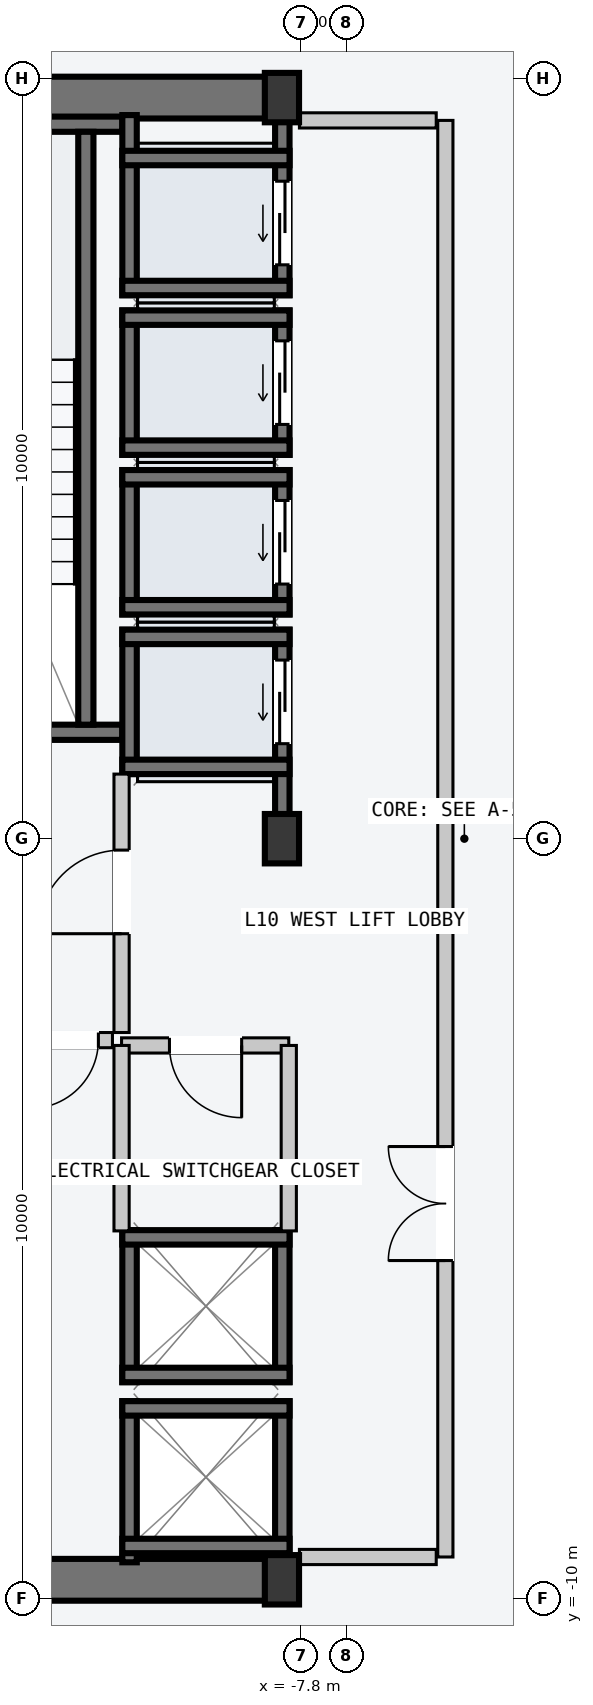
"""IFC4 building model, lengths in metres.
Left out: names, types, materials, properties, quantities, classifications, styles, units other than length and angle.
Written with IfcOpenShell. Run it as: python <this file> out.ifc"""

import sys

from ifc_helpers import new_model, si_unit, direction, frame, frame_2d, origin, origin_2d, place, context, subcontext, project, spatial, rectangle, i_section, extrude, element, fill, save


model = new_model("IFC4")
c1 = context("Model", 3, precision=1e-05, world=origin(), true_north=direction((0.0, 1.0)))
c2 = subcontext(c1, "Body", "Model", "MODEL_VIEW")
j1 = project(units=[si_unit("LENGTHUNIT", "METRE"), si_unit("PLANEANGLEUNIT", "RADIAN")], contexts=[c1])
p1 = place(None, origin())
s1 = spatial("IfcSite", under=j1, at=p1, CompositionType="ELEMENT")
p2 = place(p1, origin())
s2 = spatial("IfcBuilding", under=s1, at=p2, CompositionType="ELEMENT")
p3 = place(p2, frame((0.0, 0.0, 42.0)))
s3 = spatial("IfcBuildingStorey", under=s2, at=p3, CompositionType="ELEMENT", Elevation=42.0)
for number, where, z_axis, x_axis in (
    (1, (-14.53, -9.75, -0.2), (0.0, 0.0, 1.0), (1.0, 0.0, 0.0)),
    (2, (-14.53, 9.75, -0.2), (0.0, 0.0, 1.0), (1.0, 0.0, 0.0)),
):
    element("IfcWall", number, at=place(p3, frame(where, z_axis=z_axis, x_axis=x_axis)), inside=s3, PredefinedType="SHEAR", context=c2, shape_type="SweptSolid", body=[
        extrude(rectangle(XDim=6.46, YDim=0.55, at=frame_2d((3.23, 0.0))), origin(), (0.0, 0.0, 1.0), 3.6),
    ])
p4 = place(p3, frame((-14.25, 1.4, -0.2), z_axis=(0.0, 0.0, 1.0), x_axis=(1.0, 0.0, 0.0)))
e3 = element("IfcWall", 3, at=p4, inside=s3, PredefinedType="SOLIDWALL", context=c2, shape_type="SweptSolid", body=[
    extrude(rectangle(XDim=4.1, YDim=0.2, at=frame_2d((2.05, 0.0))), origin(), (0.0, 0.0, 1.0), 3.6),
])
p5 = place(p4, frame((1.5, 0.0, 0.2)))
e4 = element("IfcOpeningElement", 4, at=p5, cuts=e3, PredefinedType="OPENING", context=c2, shape_type="SweptSolid", body=[
    extrude(rectangle(XDim=1.12, YDim=2.18, at=frame_2d((0.56, 1.09))), frame((0.0, 0.11, 0.0), z_axis=(0.0, -1.0, 0.0), x_axis=(1.0, 0.0, 0.0)), (0.0, 0.0, 1.0), 0.22),
])
p6 = place(p3, frame((-14.25, 9.4, -0.2), z_axis=(0.0, 0.0, 1.0), x_axis=(1.0, 0.0, 0.0)))
e5 = element("IfcWall", 5, at=p6, inside=s3, PredefinedType="SOLIDWALL", context=c2, shape_type="SweptSolid", body=[
    extrude(rectangle(XDim=4.1, YDim=0.2, at=frame_2d((2.05, 0.0))), origin(), (0.0, 0.0, 1.0), 3.6),
])
p7 = place(p3, frame((-10.63, 1.5, -0.2), z_axis=(0.0, 0.0, 1.0), x_axis=(0.0, 1.0, 0.0)))
e6 = element("IfcWall", 6, at=p7, inside=s3, PredefinedType="SOLIDWALL", context=c2, shape_type="SweptSolid", body=[
    extrude(rectangle(XDim=7.8, YDim=0.2, at=frame_2d((3.9, 0.0))), origin(), (0.0, 0.0, 1.0), 3.6),
])
for number, where, z_axis, x_axis in (
    (7, (-8.05, -9.75, 0.0), (0.0, 0.0, 1.0), (1.0, 0.0, 0.0)),
    (8, (-8.05, 0.0, 0.0), (0.0, 0.0, 1.0), (1.0, 0.0, 0.0)),
    (9, (-8.05, 9.75, 0.0), (0.0, 0.0, 1.0), (1.0, 0.0, 0.0)),
):
    element("IfcColumn", number, at=place(p3, frame(where, z_axis=z_axis, x_axis=x_axis)), inside=s3, PredefinedType="COLUMN", context=c2, shape_type="SweptSolid", body=[
        extrude(i_section(OverallWidth=0.45, OverallDepth=0.65, WebThickness=0.025, FlangeThickness=0.04, at=origin_2d()), origin(), (0.0, 0.0, 1.0), 3.6),
    ])
p8 = place(p3, frame((-8.045, 0.21, -0.2), z_axis=(0.0, 0.0, 1.0), x_axis=(0.0, 1.0, 0.0)))
e10 = element("IfcWall", 10, at=p8, inside=s3, PredefinedType="SOLIDWALL", context=c2, shape_type="SweptSolid", body=[
    extrude(rectangle(XDim=2.54, YDim=0.19, at=frame_2d((1.27, 0.0))), origin(), (0.0, 0.0, 1.0), 3.6),
])
p9 = place(p8, frame((1.04, 0.0, 0.2)))
e11 = element("IfcOpeningElement", 11, at=p9, cuts=e10, PredefinedType="OPENING", context=c2, shape_type="SweptSolid", body=[
    extrude(rectangle(XDim=1.1, YDim=2.2, at=frame_2d((0.55, 1.1))), frame((0.0, 0.105, 0.0), z_axis=(0.0, -1.0, 0.0), x_axis=(1.0, 0.0, 0.0)), (0.0, 0.0, 1.0), 0.21),
])
p10 = place(p3, frame((-10.055, 0.85, -0.2), z_axis=(0.0, 0.0, 1.0), x_axis=(0.0, 1.0, 0.0)))
e12 = element("IfcWall", 12, at=p10, inside=s3, PredefinedType="SOLIDWALL", context=c2, shape_type="SweptSolid", body=[
    extrude(rectangle(XDim=1.9, YDim=0.19, at=frame_2d((0.95, 0.0))), origin(), (0.0, 0.0, 1.0), 3.6),
])
for number, where, z_axis, x_axis in (
    (13, (-10.15, 2.655, -0.2), (0.0, 0.0, 1.0), (1.0, 0.0, 0.0)),
    (14, (-10.15, 0.945, -0.2), (0.0, 0.0, 1.0), (1.0, 0.0, 0.0)),
):
    element("IfcWall", number, at=place(p3, frame(where, z_axis=z_axis, x_axis=x_axis)), inside=s3, PredefinedType="SOLIDWALL", context=c2, shape_type="SweptSolid", body=[
        extrude(rectangle(XDim=2.2, YDim=0.19, at=frame_2d((1.1, 0.0))), origin(), (0.0, 0.0, 1.0), 3.6),
    ])
p11 = place(p3, frame((-8.045, 2.95, -0.2), z_axis=(0.0, 0.0, 1.0), x_axis=(0.0, 1.0, 0.0)))
e15 = element("IfcWall", 15, at=p11, inside=s3, PredefinedType="SOLIDWALL", context=c2, shape_type="SweptSolid", body=[
    extrude(rectangle(XDim=1.9, YDim=0.19, at=frame_2d((0.95, 0.0))), origin(), (0.0, 0.0, 1.0), 3.6),
])
p12 = place(p11, frame((0.4, 0.0, 0.2)))
e16 = element("IfcOpeningElement", 16, at=p12, cuts=e15, PredefinedType="OPENING", context=c2, shape_type="SweptSolid", body=[
    extrude(rectangle(XDim=1.1, YDim=2.2, at=frame_2d((0.55, 1.1))), frame((0.0, 0.105, 0.0), z_axis=(0.0, -1.0, 0.0), x_axis=(1.0, 0.0, 0.0)), (0.0, 0.0, 1.0), 0.21),
])
p13 = place(p3, frame((-10.055, 2.95, -0.2), z_axis=(0.0, 0.0, 1.0), x_axis=(0.0, 1.0, 0.0)))
e17 = element("IfcWall", 17, at=p13, inside=s3, PredefinedType="SOLIDWALL", context=c2, shape_type="SweptSolid", body=[
    extrude(rectangle(XDim=1.9, YDim=0.19, at=frame_2d((0.95, 0.0))), origin(), (0.0, 0.0, 1.0), 3.6),
])
for number, where, z_axis, x_axis in (
    (18, (-10.15, 4.755, -0.2), (0.0, 0.0, 1.0), (1.0, 0.0, 0.0)),
    (19, (-10.15, 3.045, -0.2), (0.0, 0.0, 1.0), (1.0, 0.0, 0.0)),
):
    element("IfcWall", number, at=place(p3, frame(where, z_axis=z_axis, x_axis=x_axis)), inside=s3, PredefinedType="SOLIDWALL", context=c2, shape_type="SweptSolid", body=[
        extrude(rectangle(XDim=2.2, YDim=0.19, at=frame_2d((1.1, 0.0))), origin(), (0.0, 0.0, 1.0), 3.6),
    ])
p14 = place(p3, frame((-8.045, 5.05, -0.2), z_axis=(0.0, 0.0, 1.0), x_axis=(0.0, 1.0, 0.0)))
e20 = element("IfcWall", 20, at=p14, inside=s3, PredefinedType="SOLIDWALL", context=c2, shape_type="SweptSolid", body=[
    extrude(rectangle(XDim=1.9, YDim=0.19, at=frame_2d((0.95, 0.0))), origin(), (0.0, 0.0, 1.0), 3.6),
])
p15 = place(p14, frame((0.4, 0.0, 0.2)))
e21 = element("IfcOpeningElement", 21, at=p15, cuts=e20, PredefinedType="OPENING", context=c2, shape_type="SweptSolid", body=[
    extrude(rectangle(XDim=1.1, YDim=2.2, at=frame_2d((0.55, 1.1))), frame((0.0, 0.105, 0.0), z_axis=(0.0, -1.0, 0.0), x_axis=(1.0, 0.0, 0.0)), (0.0, 0.0, 1.0), 0.21),
])
p16 = place(p3, frame((-10.055, 5.05, -0.2), z_axis=(0.0, 0.0, 1.0), x_axis=(0.0, 1.0, 0.0)))
e22 = element("IfcWall", 22, at=p16, inside=s3, PredefinedType="SOLIDWALL", context=c2, shape_type="SweptSolid", body=[
    extrude(rectangle(XDim=1.9, YDim=0.19, at=frame_2d((0.95, 0.0))), origin(), (0.0, 0.0, 1.0), 3.6),
])
for number, where, z_axis, x_axis in (
    (23, (-10.15, 6.855, -0.2), (0.0, 0.0, 1.0), (1.0, 0.0, 0.0)),
    (24, (-10.15, 5.145, -0.2), (0.0, 0.0, 1.0), (1.0, 0.0, 0.0)),
):
    element("IfcWall", number, at=place(p3, frame(where, z_axis=z_axis, x_axis=x_axis)), inside=s3, PredefinedType="SOLIDWALL", context=c2, shape_type="SweptSolid", body=[
        extrude(rectangle(XDim=2.2, YDim=0.19, at=frame_2d((1.1, 0.0))), origin(), (0.0, 0.0, 1.0), 3.6),
    ])
p17 = place(p3, frame((-8.045, 7.15, -0.2), z_axis=(0.0, 0.0, 1.0), x_axis=(0.0, 1.0, 0.0)))
e25 = element("IfcWall", 25, at=p17, inside=s3, PredefinedType="SOLIDWALL", context=c2, shape_type="SweptSolid", body=[
    extrude(rectangle(XDim=2.37, YDim=0.19, at=frame_2d((1.185, 0.0))), origin(), (0.0, 0.0, 1.0), 3.6),
])
p18 = place(p17, frame((0.4, 0.0, 0.2)))
e26 = element("IfcOpeningElement", 26, at=p18, cuts=e25, PredefinedType="OPENING", context=c2, shape_type="SweptSolid", body=[
    extrude(rectangle(XDim=1.1, YDim=2.2, at=frame_2d((0.55, 1.1))), frame((0.0, 0.105, 0.0), z_axis=(0.0, -1.0, 0.0), x_axis=(1.0, 0.0, 0.0)), (0.0, 0.0, 1.0), 0.21),
])
p19 = place(p3, frame((-10.055, 7.15, -0.2), z_axis=(0.0, 0.0, 1.0), x_axis=(0.0, 1.0, 0.0)))
e27 = element("IfcWall", 27, at=p19, inside=s3, PredefinedType="SOLIDWALL", context=c2, shape_type="SweptSolid", body=[
    extrude(rectangle(XDim=2.37, YDim=0.19, at=frame_2d((1.185, 0.0))), origin(), (0.0, 0.0, 1.0), 3.6),
])
for number, where, z_axis, x_axis in (
    (28, (-10.15, 8.955, -0.2), (0.0, 0.0, 1.0), (1.0, 0.0, 0.0)),
    (29, (-10.15, 7.245, -0.2), (0.0, 0.0, 1.0), (1.0, 0.0, 0.0)),
):
    element("IfcWall", number, at=place(p3, frame(where, z_axis=z_axis, x_axis=x_axis)), inside=s3, PredefinedType="SOLIDWALL", context=c2, shape_type="SweptSolid", body=[
        extrude(rectangle(XDim=2.2, YDim=0.19, at=frame_2d((1.1, 0.0))), origin(), (0.0, 0.0, 1.0), 3.6),
    ])
for number, where, z_axis, x_axis in (
    (30, (-8.045, -9.52, -0.2), (0.0, 0.0, 1.0), (0.0, 1.0, 0.0)),
    (31, (-10.055, -9.52, -0.2), (0.0, 0.0, 1.0), (0.0, 1.0, 0.0)),
):
    element("IfcWall", number, at=place(p3, frame(where, z_axis=z_axis, x_axis=x_axis)), inside=s3, PredefinedType="SOLIDWALL", context=c2, shape_type="SweptSolid", body=[
        extrude(rectangle(XDim=2.12, YDim=0.19, at=frame_2d((1.06, 0.0))), origin(), (0.0, 0.0, 1.0), 3.6),
    ])
for number, where, z_axis, x_axis in (
    (32, (-10.15, -7.495, -0.2), (0.0, 0.0, 1.0), (1.0, 0.0, 0.0)),
    (33, (-10.15, -9.305, -0.2), (0.0, 0.0, 1.0), (1.0, 0.0, 0.0)),
):
    element("IfcWall", number, at=place(p3, frame(where, z_axis=z_axis, x_axis=x_axis)), inside=s3, PredefinedType="SOLIDWALL", context=c2, shape_type="SweptSolid", body=[
        extrude(rectangle(XDim=2.2, YDim=0.19, at=frame_2d((1.1, 0.0))), origin(), (0.0, 0.0, 1.0), 3.6),
    ])
for number, where, z_axis, x_axis in (
    (34, (-8.045, -7.15, -0.2), (0.0, 0.0, 1.0), (0.0, 1.0, 0.0)),
    (35, (-10.055, -7.15, -0.2), (0.0, 0.0, 1.0), (0.0, 1.0, 0.0)),
):
    element("IfcWall", number, at=place(p3, frame(where, z_axis=z_axis, x_axis=x_axis)), inside=s3, PredefinedType="SOLIDWALL", context=c2, shape_type="SweptSolid", body=[
        extrude(rectangle(XDim=2.0, YDim=0.19, at=frame_2d((1.0, 0.0))), origin(), (0.0, 0.0, 1.0), 3.6),
    ])
for number, where, z_axis, x_axis in (
    (36, (-10.15, -5.245, -0.2), (0.0, 0.0, 1.0), (1.0, 0.0, 0.0)),
    (37, (-10.15, -7.055, -0.2), (0.0, 0.0, 1.0), (1.0, 0.0, 0.0)),
):
    element("IfcWall", number, at=place(p3, frame(where, z_axis=z_axis, x_axis=x_axis)), inside=s3, PredefinedType="SOLIDWALL", context=c2, shape_type="SweptSolid", body=[
        extrude(rectangle(XDim=2.2, YDim=0.19, at=frame_2d((1.1, 0.0))), origin(), (0.0, 0.0, 1.0), 3.6),
    ])
p20 = place(p3, frame((-5.9, -9.45, 0.0), z_axis=(0.0, 0.0, 1.0), x_axis=(0.0, 1.0, 0.0)))
e38 = element("IfcWall", 38, at=p20, inside=s3, PredefinedType="PARTITIONING", context=c2, shape_type="SweptSolid", body=[
    extrude(rectangle(XDim=18.9, YDim=0.2, at=frame_2d((9.45, 0.0))), origin(), (0.0, 0.0, 1.0), 3.4),
])
p21 = place(p20, frame((3.9, 0.0, 0.0)))
e39 = element("IfcOpeningElement", 39, at=p21, cuts=e38, PredefinedType="OPENING", context=c2, shape_type="SweptSolid", body=[
    extrude(rectangle(XDim=1.5, YDim=2.2, at=frame_2d((0.75, 1.1))), frame((0.0, 0.11, 0.0), z_axis=(0.0, -1.0, 0.0), x_axis=(1.0, 0.0, 0.0)), (0.0, 0.0, 1.0), 0.22),
])
for number, where, z_axis, x_axis in (
    (40, (-6.02, -9.45, 0.0), (0.0, 0.0, 1.0), (-1.0, 0.0, 0.0)),
    (41, (-6.02, 9.45, 0.0), (0.0, 0.0, 1.0), (-1.0, 0.0, 0.0)),
):
    element("IfcWall", number, at=place(p3, frame(where, z_axis=z_axis, x_axis=x_axis)), inside=s3, PredefinedType="PARTITIONING", context=c2, shape_type="SweptSolid", body=[
        extrude(rectangle(XDim=1.8, YDim=0.2, at=frame_2d((0.9, 0.0))), origin(), (0.0, 0.0, 1.0), 3.4),
    ])
p22 = place(p3, frame((-10.16, -2.55, 0.0), z_axis=(0.0, 0.0, 1.0), x_axis=(0.0, 1.0, 0.0)))
e42 = element("IfcWall", 42, at=p22, inside=s3, PredefinedType="PARTITIONING", context=c2, shape_type="SweptSolid", body=[
    extrude(rectangle(XDim=3.4, YDim=0.2, at=frame_2d((1.7, 0.0))), origin(), (0.0, 0.0, 1.0), 3.4),
])
p23 = place(p22, frame((1.3, 0.0, 0.0)))
e43 = element("IfcOpeningElement", 43, at=p23, cuts=e42, PredefinedType="OPENING", context=c2, shape_type="SweptSolid", body=[
    extrude(rectangle(XDim=1.1, YDim=2.15, at=frame_2d((0.55, 1.075))), frame((0.0, 0.11, 0.0), z_axis=(0.0, -1.0, 0.0), x_axis=(1.0, 0.0, 0.0)), (0.0, 0.0, 1.0), 0.22),
])
p24 = place(p3, frame((-10.28, -2.65, 0.0), z_axis=(0.0, 0.0, 1.0), x_axis=(-1.0, 0.0, 0.0)))
e44 = element("IfcWall", 44, at=p24, inside=s3, PredefinedType="PARTITIONING", context=c2, shape_type="SweptSolid", body=[
    extrude(rectangle(XDim=1.27, YDim=0.2, at=frame_2d((0.635, 0.0))), origin(), (0.0, 0.0, 1.0), 3.4),
])
p25 = place(p24, frame((0.185, 0.0, 0.0)))
e45 = element("IfcOpeningElement", 45, at=p25, cuts=e44, PredefinedType="OPENING", context=c2, shape_type="SweptSolid", body=[
    extrude(rectangle(XDim=0.9, YDim=2.15, at=frame_2d((0.45, 1.075))), frame((0.0, 0.11, 0.0), z_axis=(0.0, -1.0, 0.0), x_axis=(1.0, 0.0, 0.0)), (0.0, 0.0, 1.0), 0.22),
])
p26 = place(p3, frame((-7.96, -2.72, 0.0), z_axis=(0.0, 0.0, 1.0), x_axis=(-1.0, 0.0, 0.0)))
e46 = element("IfcWall", 46, at=p26, inside=s3, PredefinedType="PARTITIONING", context=c2, shape_type="SweptSolid", body=[
    extrude(rectangle(XDim=2.2, YDim=0.2, at=frame_2d((1.1, 0.0))), origin(), (0.0, 0.0, 1.0), 3.4),
])
p27 = place(p26, frame((0.62, 0.0, 0.0)))
e47 = element("IfcOpeningElement", 47, at=p27, cuts=e46, PredefinedType="OPENING", context=c2, shape_type="SweptSolid", body=[
    extrude(rectangle(XDim=0.95, YDim=2.1, at=frame_2d((0.475, 1.05))), frame((0.0, 0.11, 0.0), z_axis=(0.0, -1.0, 0.0), x_axis=(1.0, 0.0, 0.0)), (0.0, 0.0, 1.0), 0.22),
])
for number, where, z_axis, x_axis in (
    (48, (-7.96, -5.16, 0.0), (0.0, 0.0, 1.0), (0.0, 1.0, 0.0)),
    (49, (-10.16, -5.16, 0.0), (0.0, 0.0, 1.0), (0.0, 1.0, 0.0)),
):
    element("IfcWall", number, at=place(p3, frame(where, z_axis=z_axis, x_axis=x_axis)), inside=s3, PredefinedType="PARTITIONING", context=c2, shape_type="SweptSolid", body=[
        extrude(rectangle(XDim=2.44, YDim=0.2, at=frame_2d((1.22, 0.0))), origin(), (0.0, 0.0, 1.0), 3.4),
    ])
p28 = place(p9, origin())
e50 = element("IfcDoor", 50, at=p28, inside=s3, OperationType="SLIDING_TO_LEFT", PredefinedType="DOOR", context=c2, shape_type="SweptSolid", body=[
    extrude(rectangle(XDim=1.1, YDim=2.2, at=frame_2d((0.55, 1.1))), frame((0.0, 0.025, 0.0), z_axis=(0.0, -1.0, 0.0), x_axis=(1.0, 0.0, 0.0)), (0.0, 0.0, 1.0), 0.05),
])
fill(e11, e50)
p29 = place(p12, origin())
e51 = element("IfcDoor", 51, at=p29, inside=s3, OperationType="SLIDING_TO_LEFT", PredefinedType="DOOR", context=c2, shape_type="SweptSolid", body=[
    extrude(rectangle(XDim=1.1, YDim=2.2, at=frame_2d((0.55, 1.1))), frame((0.0, 0.025, 0.0), z_axis=(0.0, -1.0, 0.0), x_axis=(1.0, 0.0, 0.0)), (0.0, 0.0, 1.0), 0.05),
])
fill(e16, e51)
p30 = place(p15, origin())
e52 = element("IfcDoor", 52, at=p30, inside=s3, OperationType="SLIDING_TO_LEFT", PredefinedType="DOOR", context=c2, shape_type="SweptSolid", body=[
    extrude(rectangle(XDim=1.1, YDim=2.2, at=frame_2d((0.55, 1.1))), frame((0.0, 0.025, 0.0), z_axis=(0.0, -1.0, 0.0), x_axis=(1.0, 0.0, 0.0)), (0.0, 0.0, 1.0), 0.05),
])
fill(e21, e52)
p31 = place(p18, origin())
e53 = element("IfcDoor", 53, at=p31, inside=s3, OperationType="SLIDING_TO_LEFT", PredefinedType="DOOR", context=c2, shape_type="SweptSolid", body=[
    extrude(rectangle(XDim=1.1, YDim=2.2, at=frame_2d((0.55, 1.1))), frame((0.0, 0.025, 0.0), z_axis=(0.0, -1.0, 0.0), x_axis=(1.0, 0.0, 0.0)), (0.0, 0.0, 1.0), 0.05),
])
fill(e26, e53)
p32 = place(p21, origin())
e54 = element("IfcDoor", 54, at=p32, inside=s3, OperationType="DOUBLE_DOOR_SINGLE_SWING", PredefinedType="DOOR", context=c2, shape_type="SweptSolid", body=[
    extrude(rectangle(XDim=1.5, YDim=2.2, at=frame_2d((0.75, 1.1))), frame((0.0, 0.025, 0.0), z_axis=(0.0, -1.0, 0.0), x_axis=(1.0, 0.0, 0.0)), (0.0, 0.0, 1.0), 0.05),
])
fill(e39, e54)
p33 = place(p23, origin())
e55 = element("IfcDoor", 55, at=p33, inside=s3, OperationType="SINGLE_SWING_LEFT", PredefinedType="DOOR", context=c2, shape_type="SweptSolid", body=[
    extrude(rectangle(XDim=1.1, YDim=2.15, at=frame_2d((0.55, 1.075))), frame((0.0, 0.025, 0.0), z_axis=(0.0, -1.0, 0.0), x_axis=(1.0, 0.0, 0.0)), (0.0, 0.0, 1.0), 0.05),
])
fill(e43, e55)
p34 = place(p25, origin())
e56 = element("IfcDoor", 56, at=p34, inside=s3, OperationType="SINGLE_SWING_RIGHT", PredefinedType="DOOR", context=c2, shape_type="SweptSolid", body=[
    extrude(rectangle(XDim=0.9, YDim=2.15, at=frame_2d((0.45, 1.075))), frame((0.0, 0.025, 0.0), z_axis=(0.0, -1.0, 0.0), x_axis=(1.0, 0.0, 0.0)), (0.0, 0.0, 1.0), 0.05),
])
fill(e45, e56)
p35 = place(p27, origin())
e57 = element("IfcDoor", 57, at=p35, inside=s3, OperationType="SINGLE_SWING_LEFT", PredefinedType="DOOR", context=c2, shape_type="SweptSolid", body=[
    extrude(rectangle(XDim=0.95, YDim=2.1, at=frame_2d((0.475, 1.05))), frame((0.0, 0.025, 0.0), z_axis=(0.0, -1.0, 0.0), x_axis=(1.0, 0.0, 0.0)), (0.0, 0.0, 1.0), 0.05),
])
fill(e47, e57)
save(model, sys.argv[1])
